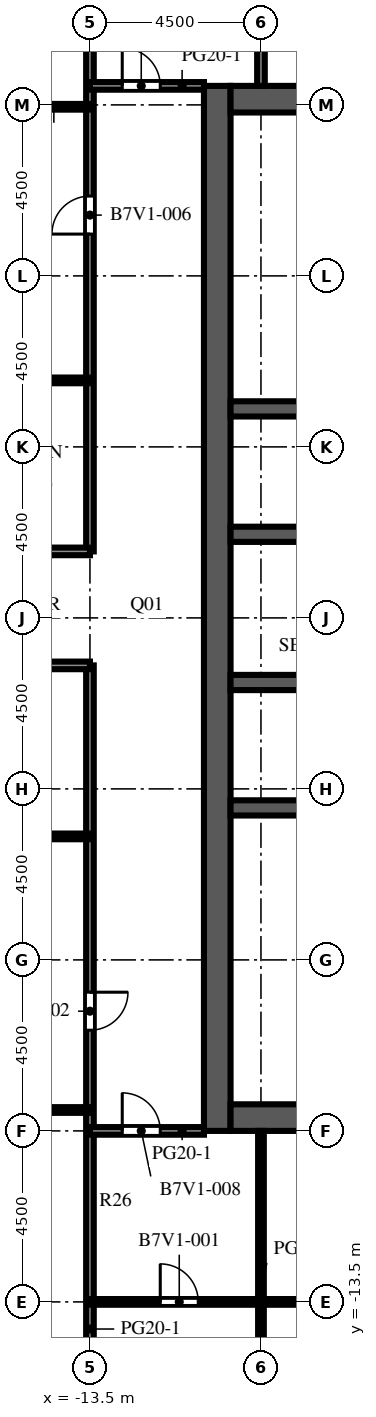
"""IFC4 building model, lengths in metres.
Left out: names, types, materials, properties, quantities, classifications, styles, units other than length and angle.
Written with IfcOpenShell. Run it as: python <this file> out.ifc"""

import sys

from ifc_helpers import new_model, si_unit, direction, frame, frame_2d, origin, place, context, subcontext, project, spatial, rectangle, extrude, element, fill, save


model = new_model("IFC4")
c1 = context("Model", 3, precision=1e-05, world=origin(), true_north=direction((0.0, 1.0)))
c2 = subcontext(c1, "Body", "Model", "MODEL_VIEW")
j1 = project(units=[si_unit("LENGTHUNIT", "METRE"), si_unit("PLANEANGLEUNIT", "RADIAN")], contexts=[c1])
p1 = place(None, origin())
s1 = spatial("IfcSite", under=j1, at=p1, CompositionType="ELEMENT")
p2 = place(p1, origin())
s2 = spatial("IfcBuilding", under=s1, at=p2, CompositionType="ELEMENT")
p3 = place(p2, frame((0.0, 0.0, 248.0)))
s3 = spatial("IfcBuildingStorey", under=s2, at=p3, CompositionType="ELEMENT", Elevation=248.0)
p4 = place(p3, frame((-10.15, -9.0, 0.0), z_axis=(0.0, 0.0, 1.0), x_axis=(0.0, 1.0, 0.0)))
e1 = element("IfcWall", 1, at=p4, inside=s3, PredefinedType="SHEAR", context=c2, shape_type="SweptSolid", body=[
    extrude(rectangle(XDim=27.5, YDim=0.7, at=frame_2d((13.75, 0.0))), origin(), (0.0, 0.0, 1.0), 4.1),
])
p5 = place(p4, frame((12.55, 0.0, 0.0)))
e2 = element("IfcOpeningElement", 2, at=p5, cuts=e1, PredefinedType="OPENING", context=c2, shape_type="SweptSolid", body=[
    extrude(rectangle(XDim=2.4, YDim=2.4, at=frame_2d((1.2, 1.2))), frame((0.0, 0.36, 0.0), z_axis=(0.0, -1.0, 0.0), x_axis=(1.0, 0.0, 0.0)), (0.0, 0.0, 1.0), 0.72),
])
p6 = place(p4, frame((6.825, 0.0, 0.0)))
e3 = element("IfcOpeningElement", 3, at=p6, cuts=e1, PredefinedType="OPENING", context=c2, shape_type="SweptSolid", body=[
    extrude(rectangle(XDim=1.2, YDim=2.1, at=frame_2d((0.6, 1.05))), frame((0.0, 0.36, 0.0), z_axis=(0.0, -1.0, 0.0), x_axis=(1.0, 0.0, 0.0)), (0.0, 0.0, 1.0), 0.72),
])
p7 = place(p4, frame((19.475, 0.0, 0.0)))
e4 = element("IfcOpeningElement", 4, at=p7, cuts=e1, PredefinedType="OPENING", context=c2, shape_type="SweptSolid", body=[
    extrude(rectangle(XDim=1.2, YDim=2.1, at=frame_2d((0.6, 1.05))), frame((0.0, 0.36, 0.0), z_axis=(0.0, -1.0, 0.0), x_axis=(1.0, 0.0, 0.0)), (0.0, 0.0, 1.0), 0.72),
])
for number, where, z_axis, x_axis in (
    (5, (-9.8, -8.65, 0.0), (0.0, 0.0, 1.0), (1.0, 0.0, 0.0)),
    (6, (-9.8, 18.15, 0.0), (0.0, 0.0, 1.0), (1.0, 0.0, 0.0)),
):
    element("IfcWall", number, at=place(p3, frame(where, z_axis=z_axis, x_axis=x_axis)), inside=s3, PredefinedType="SHEAR", context=c2, shape_type="SweptSolid", body=[
        extrude(rectangle(XDim=10.6, YDim=0.7, at=frame_2d((5.3, 0.0))), origin(), (0.0, 0.0, 1.0), 4.1),
    ])
p8 = place(p3, frame((-9.8, -0.5, 0.0), z_axis=(0.0, 0.0, 1.0), x_axis=(1.0, 0.0, 0.0)))
e7 = element("IfcWall", 7, at=p8, inside=s3, PredefinedType="SHEAR", context=c2, shape_type="SweptSolid", body=[
    extrude(rectangle(XDim=10.6, YDim=0.4, at=frame_2d((5.3, 0.0))), origin(), (0.0, 0.0, 1.0), 4.1),
])
p9 = place(p3, frame((-9.8, 2.8, 0.0), z_axis=(0.0, 0.0, 1.0), x_axis=(1.0, 0.0, 0.0)))
e8 = element("IfcWall", 8, at=p9, inside=s3, PredefinedType="SHEAR", context=c2, shape_type="SweptSolid", body=[
    extrude(rectangle(XDim=10.6, YDim=0.4, at=frame_2d((5.3, 0.0))), origin(), (0.0, 0.0, 1.0), 4.1),
])
p10 = place(p9, frame((0.688, 0.0, 0.0)))
e9 = element("IfcOpeningElement", 9, at=p10, cuts=e8, PredefinedType="OPENING", context=c2, shape_type="SweptSolid", body=[
    extrude(rectangle(XDim=1.1, YDim=2.1, at=frame_2d((0.55, 1.05))), frame((0.0, 0.21, 0.0), z_axis=(0.0, -1.0, 0.0), x_axis=(1.0, 0.0, 0.0)), (0.0, 0.0, 1.0), 0.42),
])
p11 = place(p9, frame((3.438, 0.0, 0.0)))
e10 = element("IfcOpeningElement", 10, at=p11, cuts=e8, PredefinedType="OPENING", context=c2, shape_type="SweptSolid", body=[
    extrude(rectangle(XDim=1.1, YDim=2.1, at=frame_2d((0.55, 1.05))), frame((0.0, 0.21, 0.0), z_axis=(0.0, -1.0, 0.0), x_axis=(1.0, 0.0, 0.0)), (0.0, 0.0, 1.0), 0.42),
])
p12 = place(p9, frame((6.113, 0.0, 0.0)))
e11 = element("IfcOpeningElement", 11, at=p12, cuts=e8, PredefinedType="OPENING", context=c2, shape_type="SweptSolid", body=[
    extrude(rectangle(XDim=1.0, YDim=2.1, at=frame_2d((0.5, 1.05))), frame((0.0, 0.21, 0.0), z_axis=(0.0, -1.0, 0.0), x_axis=(1.0, 0.0, 0.0)), (0.0, 0.0, 1.0), 0.42),
])
p13 = place(p9, frame((8.863, 0.0, 0.0)))
e12 = element("IfcOpeningElement", 12, at=p13, cuts=e8, PredefinedType="OPENING", context=c2, shape_type="SweptSolid", body=[
    extrude(rectangle(XDim=1.0, YDim=2.1, at=frame_2d((0.5, 1.05))), frame((0.0, 0.21, 0.0), z_axis=(0.0, -1.0, 0.0), x_axis=(1.0, 0.0, 0.0)), (0.0, 0.0, 1.0), 0.42),
])
p14 = place(p3, frame((-9.8, 6.7, 0.0), z_axis=(0.0, 0.0, 1.0), x_axis=(1.0, 0.0, 0.0)))
e13 = element("IfcWall", 13, at=p14, inside=s3, PredefinedType="SHEAR", context=c2, shape_type="SweptSolid", body=[
    extrude(rectangle(XDim=10.6, YDim=0.4, at=frame_2d((5.3, 0.0))), origin(), (0.0, 0.0, 1.0), 4.1),
])
p15 = place(p14, frame((3.438, 0.0, 0.0)))
e14 = element("IfcOpeningElement", 14, at=p15, cuts=e13, PredefinedType="OPENING", context=c2, shape_type="SweptSolid", body=[
    extrude(rectangle(XDim=1.1, YDim=2.1, at=frame_2d((0.55, 1.05))), frame((0.0, 0.21, 0.0), z_axis=(0.0, -1.0, 0.0), x_axis=(1.0, 0.0, 0.0)), (0.0, 0.0, 1.0), 0.42),
])
p16 = place(p14, frame((6.062, 0.0, 0.0)))
e15 = element("IfcOpeningElement", 15, at=p16, cuts=e13, PredefinedType="OPENING", context=c2, shape_type="SweptSolid", body=[
    extrude(rectangle(XDim=1.1, YDim=2.1, at=frame_2d((0.55, 1.05))), frame((0.0, 0.21, 0.0), z_axis=(0.0, -1.0, 0.0), x_axis=(1.0, 0.0, 0.0)), (0.0, 0.0, 1.0), 0.42),
])
p17 = place(p14, frame((8.812, 0.0, 0.0)))
e16 = element("IfcOpeningElement", 16, at=p17, cuts=e13, PredefinedType="OPENING", context=c2, shape_type="SweptSolid", body=[
    extrude(rectangle(XDim=1.1, YDim=2.1, at=frame_2d((0.55, 1.05))), frame((0.0, 0.21, 0.0), z_axis=(0.0, -1.0, 0.0), x_axis=(1.0, 0.0, 0.0)), (0.0, 0.0, 1.0), 0.42),
])
p18 = place(p14, frame((0.738, 0.0, 0.0)))
e17 = element("IfcOpeningElement", 17, at=p18, cuts=e13, PredefinedType="OPENING", context=c2, shape_type="SweptSolid", body=[
    extrude(rectangle(XDim=1.0, YDim=2.1, at=frame_2d((0.5, 1.05))), frame((0.0, 0.21, 0.0), z_axis=(0.0, -1.0, 0.0), x_axis=(1.0, 0.0, 0.0)), (0.0, 0.0, 1.0), 0.42),
])
p19 = place(p3, frame((-9.8, 10.0, 0.0), z_axis=(0.0, 0.0, 1.0), x_axis=(1.0, 0.0, 0.0)))
e18 = element("IfcWall", 18, at=p19, inside=s3, PredefinedType="SHEAR", context=c2, shape_type="SweptSolid", body=[
    extrude(rectangle(XDim=10.6, YDim=0.4, at=frame_2d((5.3, 0.0))), origin(), (0.0, 0.0, 1.0), 4.1),
])
p20 = place(p3, frame((-13.5, -22.077, 0.0), z_axis=(0.0, 0.0, 1.0), x_axis=(0.0, 1.0, 0.0)))
e19 = element("IfcWall", 19, at=p20, inside=s3, PredefinedType="PARTITIONING", context=c2, shape_type="SweptSolid", body=[
    extrude(rectangle(XDim=25.327, YDim=0.2, at=frame_2d((12.664, 0.0))), origin(), (0.0, 0.0, 1.0), 3.65),
])
p21 = place(p20, frame((15.727, 0.0, 0.0)))
e20 = element("IfcOpeningElement", 20, at=p21, cuts=e19, PredefinedType="OPENING", context=c2, shape_type="SweptSolid", body=[
    extrude(rectangle(XDim=1.0, YDim=2.1, at=frame_2d((0.5, 1.05))), frame((0.0, 0.11, 0.0), z_axis=(0.0, -1.0, 0.0), x_axis=(1.0, 0.0, 0.0)), (0.0, 0.0, 1.0), 0.22),
])
p22 = place(p3, frame((-13.5, 6.25, 0.0), z_axis=(0.0, 0.0, 1.0), x_axis=(0.0, 1.0, 0.0)))
e21 = element("IfcWall", 21, at=p22, inside=s3, PredefinedType="PARTITIONING", context=c2, shape_type="SweptSolid", body=[
    extrude(rectangle(XDim=24.827, YDim=0.2, at=frame_2d((12.414, 0.0))), origin(), (0.0, 0.0, 1.0), 3.65),
])
p23 = place(p22, frame((8.35, 0.0, 0.0)))
e22 = element("IfcOpeningElement", 22, at=p23, cuts=e21, PredefinedType="OPENING", context=c2, shape_type="SweptSolid", body=[
    extrude(rectangle(XDim=1.0, YDim=2.1, at=frame_2d((0.5, 1.05))), frame((0.0, 0.11, 0.0), z_axis=(0.0, -1.0, 0.0), x_axis=(1.0, 0.0, 0.0)), (0.0, 0.0, 1.0), 0.22),
])
p24 = place(p3, frame((-9.0, -17.5, 0.0), z_axis=(0.0, 0.0, 1.0), x_axis=(0.0, 1.0, 0.0)))
e23 = element("IfcWall", 23, at=p24, inside=s3, PredefinedType="PARTITIONING", context=c2, shape_type="SweptSolid", body=[
    extrude(rectangle(XDim=8.5, YDim=0.15, at=frame_2d((4.25, 0.0))), origin(), (0.0, 0.0, 1.0), 3.65),
])
p25 = place(p3, frame((-9.0, 18.5, 0.0), z_axis=(0.0, 0.0, 1.0), x_axis=(0.0, 1.0, 0.0)))
e24 = element("IfcWall", 24, at=p25, inside=s3, PredefinedType="PARTITIONING", context=c2, shape_type="SweptSolid", body=[
    extrude(rectangle(XDim=3.5, YDim=0.2, at=frame_2d((1.75, 0.0))), origin(), (0.0, 0.0, 1.0), 3.65),
])
p26 = place(p3, frame((21.0, -13.5, 0.0), z_axis=(0.0, 0.0, 1.0), x_axis=(-1.0, 0.0, 0.0)))
e25 = element("IfcWall", 25, at=p26, inside=s3, PredefinedType="PARTITIONING", context=c2, shape_type="SweptSolid", body=[
    extrude(rectangle(XDim=34.5, YDim=0.15, at=frame_2d((17.25, 0.0))), origin(), (0.0, 0.0, 1.0), 3.65),
])
p27 = place(p26, frame((31.65, 0.0, 0.0)))
e26 = element("IfcOpeningElement", 26, at=p27, cuts=e25, PredefinedType="OPENING", context=c2, shape_type="SweptSolid", body=[
    extrude(rectangle(XDim=1.0, YDim=2.1, at=frame_2d((0.5, 1.05))), frame((0.0, 0.085, 0.0), z_axis=(0.0, -1.0, 0.0), x_axis=(1.0, 0.0, 0.0)), (0.0, 0.0, 1.0), 0.17),
])
p28 = place(p26, frame((22.15, 0.0, 0.0)))
e27 = element("IfcOpeningElement", 27, at=p28, cuts=e25, PredefinedType="OPENING", context=c2, shape_type="SweptSolid", body=[
    extrude(rectangle(XDim=1.0, YDim=2.1, at=frame_2d((0.5, 1.05))), frame((0.0, 0.085, 0.0), z_axis=(0.0, -1.0, 0.0), x_axis=(1.0, 0.0, 0.0)), (0.0, 0.0, 1.0), 0.17),
])
p29 = place(p26, frame((13.15, 0.0, 0.0)))
e28 = element("IfcOpeningElement", 28, at=p29, cuts=e25, PredefinedType="OPENING", context=c2, shape_type="SweptSolid", body=[
    extrude(rectangle(XDim=1.0, YDim=2.1, at=frame_2d((0.5, 1.05))), frame((0.0, 0.085, 0.0), z_axis=(0.0, -1.0, 0.0), x_axis=(1.0, 0.0, 0.0)), (0.0, 0.0, 1.0), 0.17),
])
p30 = place(p26, frame((6.15, 0.0, 0.0)))
e29 = element("IfcOpeningElement", 29, at=p30, cuts=e25, PredefinedType="OPENING", context=c2, shape_type="SweptSolid", body=[
    extrude(rectangle(XDim=1.0, YDim=2.1, at=frame_2d((0.5, 1.05))), frame((0.0, 0.085, 0.0), z_axis=(0.0, -1.0, 0.0), x_axis=(1.0, 0.0, 0.0)), (0.0, 0.0, 1.0), 0.17),
])
p31 = place(p3, frame((-10.5, -9.0, 0.0), z_axis=(0.0, 0.0, 1.0), x_axis=(-1.0, 0.0, 0.0)))
e30 = element("IfcWall", 30, at=p31, inside=s3, PredefinedType="PARTITIONING", context=c2, shape_type="SweptSolid", body=[
    extrude(rectangle(XDim=3.0, YDim=0.2, at=frame_2d((1.5, 0.0))), origin(), (0.0, 0.0, 1.0), 3.65),
])
p32 = place(p31, frame((1.15, 0.0, 0.0)))
e31 = element("IfcOpeningElement", 31, at=p32, cuts=e30, PredefinedType="OPENING", context=c2, shape_type="SweptSolid", body=[
    extrude(rectangle(XDim=1.0, YDim=2.1, at=frame_2d((0.5, 1.05))), frame((0.0, 0.11, 0.0), z_axis=(0.0, -1.0, 0.0), x_axis=(1.0, 0.0, 0.0)), (0.0, 0.0, 1.0), 0.22),
])
p33 = place(p3, frame((-13.5, -8.45, 0.0), z_axis=(0.0, 0.0, 1.0), x_axis=(-1.0, 0.0, 0.0)))
e32 = element("IfcWall", 32, at=p33, inside=s3, PredefinedType="PARTITIONING", context=c2, shape_type="SweptSolid", body=[
    extrude(rectangle(XDim=4.35, YDim=0.15, at=frame_2d((2.175, 0.0))), origin(), (0.0, 0.0, 1.0), 3.65),
])
p34 = place(p33, frame((2.15, 0.0, 0.0)))
e33 = element("IfcOpeningElement", 33, at=p34, cuts=e32, PredefinedType="OPENING", context=c2, shape_type="SweptSolid", body=[
    extrude(rectangle(XDim=1.0, YDim=2.1, at=frame_2d((0.5, 1.05))), frame((0.0, 0.085, 0.0), z_axis=(0.0, -1.0, 0.0), x_axis=(1.0, 0.0, 0.0)), (0.0, 0.0, 1.0), 0.17),
])
p35 = place(p3, frame((-17.85, -1.25, 0.0), z_axis=(0.0, 0.0, 1.0), x_axis=(1.0, 0.0, 0.0)))
e34 = element("IfcWall", 34, at=p35, inside=s3, PredefinedType="PARTITIONING", context=c2, shape_type="SweptSolid", body=[
    extrude(rectangle(XDim=4.35, YDim=0.15, at=frame_2d((2.175, 0.0))), origin(), (0.0, 0.0, 1.0), 3.65),
])
p36 = place(p35, frame((1.7, 0.0, 0.0)))
e35 = element("IfcOpeningElement", 35, at=p36, cuts=e34, PredefinedType="OPENING", context=c2, shape_type="SweptSolid", body=[
    extrude(rectangle(XDim=1.0, YDim=2.1, at=frame_2d((0.5, 1.05))), frame((0.0, 0.085, 0.0), z_axis=(0.0, -1.0, 0.0), x_axis=(1.0, 0.0, 0.0)), (0.0, 0.0, 1.0), 0.17),
])
for number, where, z_axis, x_axis in (
    (36, (-17.85, 3.25, 0.0), (0.0, 0.0, 1.0), (1.0, 0.0, 0.0)),
    (37, (-17.85, 6.25, 0.0), (0.0, 0.0, 1.0), (1.0, 0.0, 0.0)),
):
    element("IfcWall", number, at=place(p3, frame(where, z_axis=z_axis, x_axis=x_axis)), inside=s3, PredefinedType="PARTITIONING", context=c2, shape_type="SweptSolid", body=[
        extrude(rectangle(XDim=4.35, YDim=0.2, at=frame_2d((2.175, 0.0))), origin(), (0.0, 0.0, 1.0), 3.65),
    ])
p37 = place(p3, frame((-13.5, 10.75, 0.0), z_axis=(0.0, 0.0, 1.0), x_axis=(-1.0, 0.0, 0.0)))
e38 = element("IfcWall", 38, at=p37, inside=s3, PredefinedType="PARTITIONING", context=c2, shape_type="SweptSolid", body=[
    extrude(rectangle(XDim=4.35, YDim=0.15, at=frame_2d((2.175, 0.0))), origin(), (0.0, 0.0, 1.0), 3.65),
])
p38 = place(p37, frame((1.65, 0.0, 0.0)))
e39 = element("IfcOpeningElement", 39, at=p38, cuts=e38, PredefinedType="OPENING", context=c2, shape_type="SweptSolid", body=[
    extrude(rectangle(XDim=1.0, YDim=2.1, at=frame_2d((0.5, 1.05))), frame((0.0, 0.085, 0.0), z_axis=(0.0, -1.0, 0.0), x_axis=(1.0, 0.0, 0.0)), (0.0, 0.0, 1.0), 0.17),
])
p39 = place(p3, frame((-17.6, 17.95, 0.0), z_axis=(0.0, 0.0, 1.0), x_axis=(1.0, 0.0, 0.0)))
e40 = element("IfcWall", 40, at=p39, inside=s3, PredefinedType="PARTITIONING", context=c2, shape_type="SweptSolid", body=[
    extrude(rectangle(XDim=4.1, YDim=0.15, at=frame_2d((2.05, 0.0))), origin(), (0.0, 0.0, 1.0), 3.65),
])
p40 = place(p39, frame((1.2, 0.0, 0.0)))
e41 = element("IfcOpeningElement", 41, at=p40, cuts=e40, PredefinedType="OPENING", context=c2, shape_type="SweptSolid", body=[
    extrude(rectangle(XDim=1.0, YDim=2.1, at=frame_2d((0.5, 1.05))), frame((0.0, 0.085, 0.0), z_axis=(0.0, -1.0, 0.0), x_axis=(1.0, 0.0, 0.0)), (0.0, 0.0, 1.0), 0.17),
])
p41 = place(p3, frame((-13.5, 18.5, 0.0), z_axis=(0.0, 0.0, 1.0), x_axis=(1.0, 0.0, 0.0)))
e42 = element("IfcWall", 42, at=p41, inside=s3, PredefinedType="PARTITIONING", context=c2, shape_type="SweptSolid", body=[
    extrude(rectangle(XDim=3.0, YDim=0.2, at=frame_2d((1.5, 0.0))), origin(), (0.0, 0.0, 1.0), 3.65),
])
p42 = place(p41, frame((0.85, 0.0, 0.0)))
e43 = element("IfcOpeningElement", 43, at=p42, cuts=e42, PredefinedType="OPENING", context=c2, shape_type="SweptSolid", body=[
    extrude(rectangle(XDim=1.0, YDim=2.1, at=frame_2d((0.5, 1.05))), frame((0.0, 0.11, 0.0), z_axis=(0.0, -1.0, 0.0), x_axis=(1.0, 0.0, 0.0)), (0.0, 0.0, 1.0), 0.22),
])
p43 = place(p10, origin())
e44 = element("IfcDoor", 44, at=p43, inside=s3, OperationType="DOUBLE_DOOR_SLIDING", PredefinedType="DOOR", context=c2, shape_type="SweptSolid", body=[
    extrude(rectangle(XDim=1.1, YDim=2.1, at=frame_2d((0.55, 1.05))), frame((0.0, 0.025, 0.0), z_axis=(0.0, -1.0, 0.0), x_axis=(1.0, 0.0, 0.0)), (0.0, 0.0, 1.0), 0.05),
])
fill(e9, e44)
p44 = place(p5, origin())
e45 = element("IfcDoor", 45, at=p44, inside=s3, OperationType="DOUBLE_DOOR_DOUBLE_SWING", PredefinedType="DOOR", context=c2, shape_type="SweptSolid", body=[
    extrude(rectangle(XDim=2.4, YDim=2.4, at=frame_2d((1.2, 1.2))), frame((0.0, 0.025, 0.0), z_axis=(0.0, -1.0, 0.0), x_axis=(1.0, 0.0, 0.0)), (0.0, 0.0, 1.0), 0.05),
])
fill(e2, e45)
p45 = place(p6, origin())
e46 = element("IfcDoor", 46, at=p45, inside=s3, OperationType="SINGLE_SWING_LEFT", PredefinedType="DOOR", context=c2, shape_type="SweptSolid", body=[
    extrude(rectangle(XDim=1.2, YDim=2.1, at=frame_2d((0.6, 1.05))), frame((0.0, 0.025, 0.0), z_axis=(0.0, -1.0, 0.0), x_axis=(1.0, 0.0, 0.0)), (0.0, 0.0, 1.0), 0.05),
])
fill(e3, e46)
p46 = place(p7, origin())
e47 = element("IfcDoor", 47, at=p46, inside=s3, OperationType="SINGLE_SWING_LEFT", PredefinedType="DOOR", context=c2, shape_type="SweptSolid", body=[
    extrude(rectangle(XDim=1.2, YDim=2.1, at=frame_2d((0.6, 1.05))), frame((0.0, 0.025, 0.0), z_axis=(0.0, -1.0, 0.0), x_axis=(1.0, 0.0, 0.0)), (0.0, 0.0, 1.0), 0.05),
])
fill(e4, e47)
p47 = place(p18, origin())
e48 = element("IfcDoor", 48, at=p47, inside=s3, OperationType="SINGLE_SWING_LEFT", PredefinedType="DOOR", context=c2, shape_type="SweptSolid", body=[
    extrude(rectangle(XDim=1.0, YDim=2.1, at=frame_2d((0.5, 1.05))), frame((0.0, 0.025, 0.0), z_axis=(0.0, -1.0, 0.0), x_axis=(1.0, 0.0, 0.0)), (0.0, 0.0, 1.0), 0.05),
])
fill(e17, e48)
p48 = place(p27, origin())
e49 = element("IfcDoor", 49, at=p48, inside=s3, OperationType="SINGLE_SWING_RIGHT", PredefinedType="DOOR", context=c2, shape_type="SweptSolid", body=[
    extrude(rectangle(XDim=1.0, YDim=2.1, at=frame_2d((0.5, 1.05))), frame((0.0, 0.025, 0.0), z_axis=(0.0, -1.0, 0.0), x_axis=(1.0, 0.0, 0.0)), (0.0, 0.0, 1.0), 0.05),
])
fill(e26, e49)
p49 = place(p21, origin())
e50 = element("IfcDoor", 50, at=p49, inside=s3, OperationType="SINGLE_SWING_RIGHT", PredefinedType="DOOR", context=c2, shape_type="SweptSolid", body=[
    extrude(rectangle(XDim=1.0, YDim=2.1, at=frame_2d((0.5, 1.05))), frame((0.0, 0.025, 0.0), z_axis=(0.0, -1.0, 0.0), x_axis=(1.0, 0.0, 0.0)), (0.0, 0.0, 1.0), 0.05),
])
fill(e20, e50)
p50 = place(p23, origin())
e51 = element("IfcDoor", 51, at=p50, inside=s3, OperationType="SINGLE_SWING_LEFT", PredefinedType="DOOR", context=c2, shape_type="SweptSolid", body=[
    extrude(rectangle(XDim=1.0, YDim=2.1, at=frame_2d((0.5, 1.05))), frame((0.0, 0.025, 0.0), z_axis=(0.0, -1.0, 0.0), x_axis=(1.0, 0.0, 0.0)), (0.0, 0.0, 1.0), 0.05),
])
fill(e22, e51)
p51 = place(p32, origin())
e52 = element("IfcDoor", 52, at=p51, inside=s3, OperationType="SINGLE_SWING_RIGHT", PredefinedType="DOOR", context=c2, shape_type="SweptSolid", body=[
    extrude(rectangle(XDim=1.0, YDim=2.1, at=frame_2d((0.5, 1.05))), frame((0.0, 0.025, 0.0), z_axis=(0.0, -1.0, 0.0), x_axis=(1.0, 0.0, 0.0)), (0.0, 0.0, 1.0), 0.05),
])
fill(e31, e52)
p52 = place(p42, origin())
e53 = element("IfcDoor", 53, at=p52, inside=s3, OperationType="SINGLE_SWING_LEFT", PredefinedType="DOOR", context=c2, shape_type="SweptSolid", body=[
    extrude(rectangle(XDim=1.0, YDim=2.1, at=frame_2d((0.5, 1.05))), frame((0.0, 0.025, 0.0), z_axis=(0.0, -1.0, 0.0), x_axis=(1.0, 0.0, 0.0)), (0.0, 0.0, 1.0), 0.05),
])
fill(e43, e53)
save(model, sys.argv[1])
